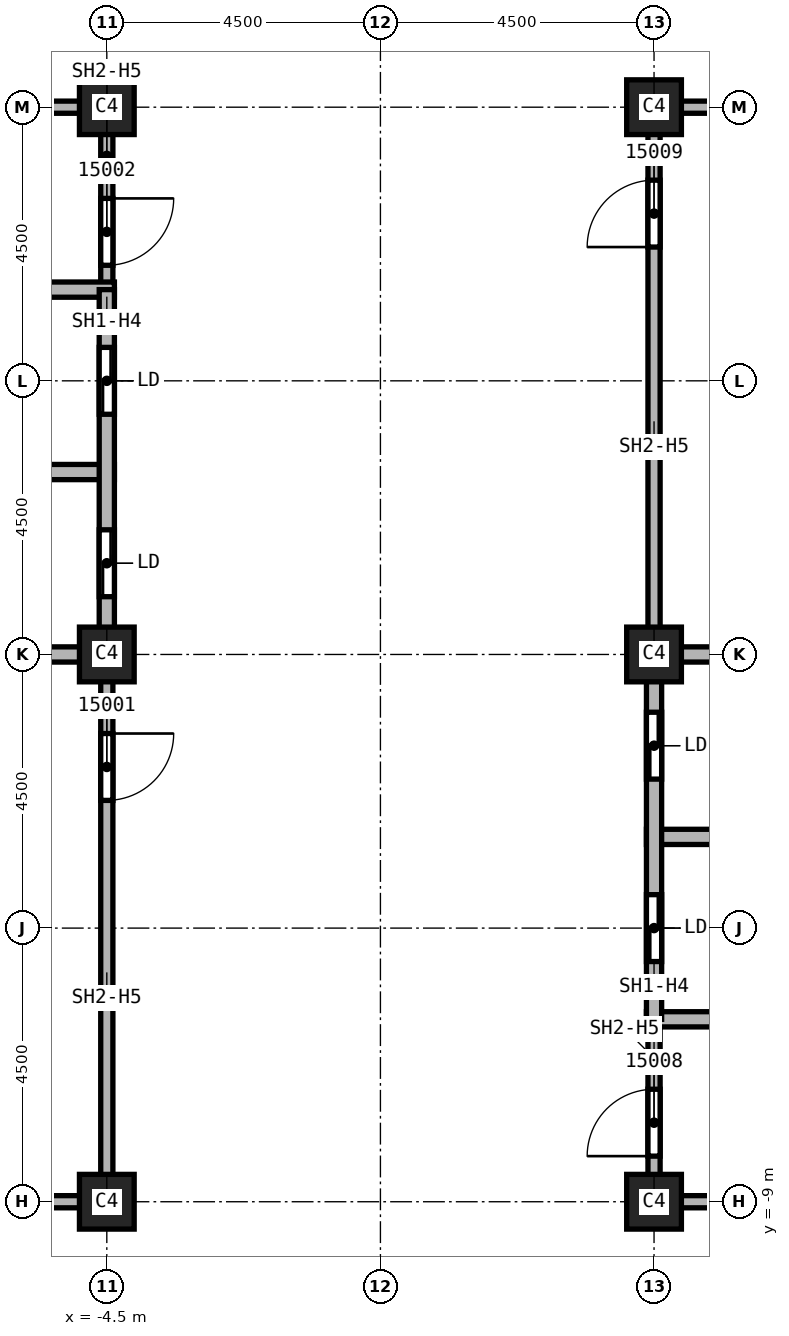
"""IFC4 building model, lengths in metres.
Left out: names, types, materials, properties, quantities, classifications, styles, units other than length and angle.
Written with IfcOpenShell. Run it as: python <this file> out.ifc"""

import sys

from ifc_helpers import new_model, si_unit, direction, frame, frame_2d, origin, origin_2d, place, context, subcontext, project, spatial, rectangle, extrude, element, fill, save


model = new_model("IFC4")
c1 = context("Model", 3, precision=1e-05, world=origin(), true_north=direction((0.0, 1.0)))
c2 = subcontext(c1, "Body", "Model", "MODEL_VIEW")
j1 = project(units=[si_unit("LENGTHUNIT", "METRE"), si_unit("PLANEANGLEUNIT", "RADIAN")], contexts=[c1])
p1 = place(None, origin())
s1 = spatial("IfcSite", under=j1, at=p1, CompositionType="ELEMENT")
p2 = place(p1, origin())
s2 = spatial("IfcBuilding", under=s1, at=p2, CompositionType="ELEMENT")
p3 = place(p2, frame((0.0, 0.0, 232.0)))
s3 = spatial("IfcBuildingStorey", under=s2, at=p3, CompositionType="ELEMENT", Elevation=232.0)
for number, where, z_axis, x_axis in (
    (1, (4.5, 0.0, 0.0), (0.0, 0.0, 1.0), (1.0, 0.0, 0.0)),
    (2, (4.5, 9.0, 0.0), (0.0, 0.0, 1.0), (1.0, 0.0, 0.0)),
    (3, (4.5, -9.0, 0.0), (0.0, 0.0, 1.0), (1.0, 0.0, 0.0)),
    (4, (-4.5, 0.0, 0.0), (0.0, 0.0, 1.0), (1.0, 0.0, 0.0)),
    (5, (-4.5, 9.0, 0.0), (0.0, 0.0, 1.0), (1.0, 0.0, 0.0)),
    (6, (-4.5, -9.0, 0.0), (0.0, 0.0, 1.0), (1.0, 0.0, 0.0)),
):
    element("IfcColumn", number, at=place(p3, frame(where, z_axis=z_axis, x_axis=x_axis)), inside=s3, PredefinedType="COLUMN", context=c2, shape_type="SweptSolid", body=[
        extrude(rectangle(XDim=0.9, YDim=0.9, at=origin_2d()), origin(), (0.0, 0.0, 1.0), 3.6),
    ])
for number, where, z_axis, x_axis in (
    (7, (-7.5, 9.0, 0.0), (0.0, 0.0, 1.0), (1.0, 0.0, 0.0)),
    (8, (-4.5, -9.0, 0.0), (0.0, 0.0, 1.0), (-1.0, 0.0, 0.0)),
):
    element("IfcWall", number, at=place(p3, frame(where, z_axis=z_axis, x_axis=x_axis)), inside=s3, PredefinedType="SOLIDWALL", context=c2, shape_type="SweptSolid", body=[
        extrude(rectangle(XDim=3.0, YDim=0.2, at=frame_2d((1.5, 0.0))), origin(), (0.0, 0.0, 1.0), 2.838),
    ])
p4 = place(p3, frame((-4.5, 0.0, 0.0), z_axis=(0.0, 0.0, 1.0), x_axis=(0.0, -1.0, 0.0)))
e9 = element("IfcWall", 9, at=p4, inside=s3, PredefinedType="SOLIDWALL", context=c2, shape_type="SweptSolid", body=[
    extrude(rectangle(XDim=9.1, YDim=0.2, at=frame_2d((4.55, 0.0))), origin(), (0.0, 0.0, 1.0), 2.838),
])
p5 = place(p4, frame((1.3, 0.0, 0.0)))
e10 = element("IfcOpeningElement", 10, at=p5, cuts=e9, PredefinedType="OPENING", context=c2, shape_type="SweptSolid", body=[
    extrude(rectangle(XDim=1.1, YDim=2.1, at=frame_2d((0.55, 1.05))), frame((0.0, 0.1, 0.0), z_axis=(0.0, -1.0, 0.0), x_axis=(1.0, 0.0, 0.0)), (0.0, 0.0, 1.0), 0.2),
])
p6 = place(p3, frame((-4.5, 9.1, 0.0), z_axis=(0.0, 0.0, 1.0), x_axis=(0.0, -1.0, 0.0)))
e11 = element("IfcWall", 11, at=p6, inside=s3, PredefinedType="SOLIDWALL", context=c2, shape_type="SweptSolid", body=[
    extrude(rectangle(XDim=3.1, YDim=0.2, at=frame_2d((1.55, 0.0))), origin(), (0.0, 0.0, 1.0), 2.838),
])
p7 = place(p6, frame((1.6, 0.0, 0.0)))
e12 = element("IfcOpeningElement", 12, at=p7, cuts=e11, PredefinedType="OPENING", context=c2, shape_type="SweptSolid", body=[
    extrude(rectangle(XDim=1.1, YDim=2.1, at=frame_2d((0.55, 1.05))), frame((0.0, 0.1, 0.0), z_axis=(0.0, -1.0, 0.0), x_axis=(1.0, 0.0, 0.0)), (0.0, 0.0, 1.0), 0.2),
])
p8 = place(p3, frame((4.5, -9.1, 0.0), z_axis=(0.0, 0.0, 1.0), x_axis=(0.0, 1.0, 0.0)))
e13 = element("IfcWall", 13, at=p8, inside=s3, PredefinedType="SOLIDWALL", context=c2, shape_type="SweptSolid", body=[
    extrude(rectangle(XDim=3.1, YDim=0.2, at=frame_2d((1.55, 0.0))), origin(), (0.0, 0.0, 1.0), 2.838),
])
p9 = place(p8, frame((0.85, 0.0, 0.0)))
e14 = element("IfcOpeningElement", 14, at=p9, cuts=e13, PredefinedType="OPENING", context=c2, shape_type="SweptSolid", body=[
    extrude(rectangle(XDim=1.1, YDim=2.1, at=frame_2d((0.55, 1.05))), frame((0.0, 0.1, 0.0), z_axis=(0.0, -1.0, 0.0), x_axis=(1.0, 0.0, 0.0)), (0.0, 0.0, 1.0), 0.2),
])
p10 = place(p3, frame((4.5, 0.0, 0.0), z_axis=(0.0, 0.0, 1.0), x_axis=(0.0, 1.0, 0.0)))
e15 = element("IfcWall", 15, at=p10, inside=s3, PredefinedType="SOLIDWALL", context=c2, shape_type="SweptSolid", body=[
    extrude(rectangle(XDim=9.1, YDim=0.2, at=frame_2d((4.55, 0.0))), origin(), (0.0, 0.0, 1.0), 2.838),
])
p11 = place(p10, frame((6.7, 0.0, 0.0)))
e16 = element("IfcOpeningElement", 16, at=p11, cuts=e15, PredefinedType="OPENING", context=c2, shape_type="SweptSolid", body=[
    extrude(rectangle(XDim=1.1, YDim=2.1, at=frame_2d((0.55, 1.05))), frame((0.0, 0.1, 0.0), z_axis=(0.0, -1.0, 0.0), x_axis=(1.0, 0.0, 0.0)), (0.0, 0.0, 1.0), 0.2),
])
for number, where, z_axis, x_axis in (
    (17, (4.5, 9.0, 0.0), (0.0, 0.0, 1.0), (1.0, 0.0, 0.0)),
    (18, (7.5, -9.0, 0.0), (0.0, 0.0, 1.0), (-1.0, 0.0, 0.0)),
):
    element("IfcWall", number, at=place(p3, frame(where, z_axis=z_axis, x_axis=x_axis)), inside=s3, PredefinedType="SOLIDWALL", context=c2, shape_type="SweptSolid", body=[
        extrude(rectangle(XDim=3.0, YDim=0.2, at=frame_2d((1.5, 0.0))), origin(), (0.0, 0.0, 1.0), 2.838),
    ])
p12 = place(p3, frame((-13.625, 3.0, 0.0), z_axis=(0.0, 0.0, 1.0), x_axis=(1.0, 0.0, 0.0)))
e19 = element("IfcWall", 19, at=p12, inside=s3, PredefinedType="SOLIDWALL", context=c2, shape_type="SweptSolid", body=[
    extrude(rectangle(XDim=9.25, YDim=0.25, at=frame_2d((4.625, 0.0))), origin(), (0.0, 0.0, 1.0), 3.6),
])
p13 = place(p12, frame((3.25, 0.0, 0.0)))
e20 = element("IfcOpeningElement", 20, at=p13, cuts=e19, PredefinedType="OPENING", context=c2, shape_type="SweptSolid", body=[
    extrude(rectangle(XDim=1.1, YDim=2.1, at=frame_2d((0.55, 1.05))), frame((0.0, 0.125, 0.0), z_axis=(0.0, -1.0, 0.0), x_axis=(1.0, 0.0, 0.0)), (0.0, 0.0, 1.0), 0.25),
])
for number, where, z_axis, x_axis in (
    (21, (-7.625, 0.0, 0.0), (0.0, 0.0, 1.0), (1.0, 0.0, 0.0)),
    (22, (-7.625, 6.0, 0.0), (0.0, 0.0, 1.0), (1.0, 0.0, 0.0)),
):
    element("IfcWall", number, at=place(p3, frame(where, z_axis=z_axis, x_axis=x_axis)), inside=s3, PredefinedType="SOLIDWALL", context=c2, shape_type="SweptSolid", body=[
        extrude(rectangle(XDim=3.25, YDim=0.25, at=frame_2d((1.625, 0.0))), origin(), (0.0, 0.0, 1.0), 3.6),
    ])
p14 = place(p3, frame((-4.5, 6.0, 0.0), z_axis=(0.0, 0.0, 1.0), x_axis=(0.0, -1.0, 0.0)))
e23 = element("IfcWall", 23, at=p14, inside=s3, PredefinedType="SOLIDWALL", context=c2, shape_type="SweptSolid", body=[
    extrude(rectangle(XDim=6.0, YDim=0.25, at=frame_2d((3.0, 0.0))), origin(), (0.0, 0.0, 1.0), 2.838),
])
p15 = place(p14, frame((3.95, 0.0, 0.0)))
e24 = element("IfcOpeningElement", 24, at=p15, cuts=e23, PredefinedType="OPENING", context=c2, shape_type="SweptSolid", body=[
    extrude(rectangle(XDim=1.1, YDim=2.1, at=frame_2d((0.55, 1.05))), frame((0.0, 0.125, 0.0), z_axis=(0.0, -1.0, 0.0), x_axis=(1.0, 0.0, 0.0)), (0.0, 0.0, 1.0), 0.25),
])
p16 = place(p14, frame((0.95, 0.0, 0.0)))
e25 = element("IfcOpeningElement", 25, at=p16, cuts=e23, PredefinedType="OPENING", context=c2, shape_type="SweptSolid", body=[
    extrude(rectangle(XDim=1.1, YDim=2.1, at=frame_2d((0.55, 1.05))), frame((0.0, 0.125, 0.0), z_axis=(0.0, -1.0, 0.0), x_axis=(1.0, 0.0, 0.0)), (0.0, 0.0, 1.0), 0.25),
])
p17 = place(p3, frame((4.375, -6.0, 0.0), z_axis=(0.0, 0.0, 1.0), x_axis=(1.0, 0.0, 0.0)))
e26 = element("IfcWall", 26, at=p17, inside=s3, PredefinedType="SOLIDWALL", context=c2, shape_type="SweptSolid", body=[
    extrude(rectangle(XDim=3.25, YDim=0.25, at=frame_2d((1.625, 0.0))), origin(), (0.0, 0.0, 1.0), 3.6),
])
p18 = place(p3, frame((4.375, -3.0, 0.0), z_axis=(0.0, 0.0, 1.0), x_axis=(1.0, 0.0, 0.0)))
e27 = element("IfcWall", 27, at=p18, inside=s3, PredefinedType="SOLIDWALL", context=c2, shape_type="SweptSolid", body=[
    extrude(rectangle(XDim=9.25, YDim=0.25, at=frame_2d((4.625, 0.0))), origin(), (0.0, 0.0, 1.0), 3.6),
])
p19 = place(p18, frame((4.875, 0.0, 0.0)))
e28 = element("IfcOpeningElement", 28, at=p19, cuts=e27, PredefinedType="OPENING", context=c2, shape_type="SweptSolid", body=[
    extrude(rectangle(XDim=1.1, YDim=2.1, at=frame_2d((0.55, 1.05))), frame((0.0, 0.125, 0.0), z_axis=(0.0, -1.0, 0.0), x_axis=(1.0, 0.0, 0.0)), (0.0, 0.0, 1.0), 0.25),
])
p20 = place(p3, frame((4.375, 0.0, 0.0), z_axis=(0.0, 0.0, 1.0), x_axis=(1.0, 0.0, 0.0)))
e29 = element("IfcWall", 29, at=p20, inside=s3, PredefinedType="SOLIDWALL", context=c2, shape_type="SweptSolid", body=[
    extrude(rectangle(XDim=3.25, YDim=0.25, at=frame_2d((1.625, 0.0))), origin(), (0.0, 0.0, 1.0), 3.6),
])
p21 = place(p3, frame((4.5, -6.0, 0.0), z_axis=(0.0, 0.0, 1.0), x_axis=(0.0, 1.0, 0.0)))
e30 = element("IfcWall", 30, at=p21, inside=s3, PredefinedType="SOLIDWALL", context=c2, shape_type="SweptSolid", body=[
    extrude(rectangle(XDim=6.0, YDim=0.25, at=frame_2d((3.0, 0.0))), origin(), (0.0, 0.0, 1.0), 2.838),
])
p22 = place(p21, frame((0.95, 0.0, 0.0)))
e31 = element("IfcOpeningElement", 31, at=p22, cuts=e30, PredefinedType="OPENING", context=c2, shape_type="SweptSolid", body=[
    extrude(rectangle(XDim=1.1, YDim=2.1, at=frame_2d((0.55, 1.05))), frame((0.0, 0.125, 0.0), z_axis=(0.0, -1.0, 0.0), x_axis=(1.0, 0.0, 0.0)), (0.0, 0.0, 1.0), 0.25),
])
p23 = place(p21, frame((3.95, 0.0, 0.0)))
e32 = element("IfcOpeningElement", 32, at=p23, cuts=e30, PredefinedType="OPENING", context=c2, shape_type="SweptSolid", body=[
    extrude(rectangle(XDim=1.1, YDim=2.1, at=frame_2d((0.55, 1.05))), frame((0.0, 0.125, 0.0), z_axis=(0.0, -1.0, 0.0), x_axis=(1.0, 0.0, 0.0)), (0.0, 0.0, 1.0), 0.25),
])
p24 = place(p5, origin())
e33 = element("IfcDoor", 33, at=p24, inside=s3, OperationType="SINGLE_SWING_RIGHT", PredefinedType="DOOR", context=c2, shape_type="SweptSolid", body=[
    extrude(rectangle(XDim=1.1, YDim=2.1, at=frame_2d((0.55, 1.05))), frame((0.0, 0.025, 0.0), z_axis=(0.0, -1.0, 0.0), x_axis=(1.0, 0.0, 0.0)), (0.0, 0.0, 1.0), 0.05),
])
fill(e10, e33)
p25 = place(p7, origin())
e34 = element("IfcDoor", 34, at=p25, inside=s3, OperationType="SINGLE_SWING_LEFT", PredefinedType="DOOR", context=c2, shape_type="SweptSolid", body=[
    extrude(rectangle(XDim=1.1, YDim=2.1, at=frame_2d((0.55, 1.05))), frame((0.0, 0.025, 0.0), z_axis=(0.0, -1.0, 0.0), x_axis=(1.0, 0.0, 0.0)), (0.0, 0.0, 1.0), 0.05),
])
fill(e12, e34)
p26 = place(p9, origin())
e35 = element("IfcDoor", 35, at=p26, inside=s3, OperationType="SINGLE_SWING_LEFT", PredefinedType="DOOR", context=c2, shape_type="SweptSolid", body=[
    extrude(rectangle(XDim=1.1, YDim=2.1, at=frame_2d((0.55, 1.05))), frame((0.0, 0.025, 0.0), z_axis=(0.0, -1.0, 0.0), x_axis=(1.0, 0.0, 0.0)), (0.0, 0.0, 1.0), 0.05),
])
fill(e14, e35)
p27 = place(p11, origin())
e36 = element("IfcDoor", 36, at=p27, inside=s3, OperationType="SINGLE_SWING_RIGHT", PredefinedType="DOOR", context=c2, shape_type="SweptSolid", body=[
    extrude(rectangle(XDim=1.1, YDim=2.1, at=frame_2d((0.55, 1.05))), frame((0.0, 0.025, 0.0), z_axis=(0.0, -1.0, 0.0), x_axis=(1.0, 0.0, 0.0)), (0.0, 0.0, 1.0), 0.05),
])
fill(e16, e36)
p28 = place(p15, origin())
e37 = element("IfcDoor", 37, at=p28, inside=s3, OperationType="SLIDING_TO_LEFT", PredefinedType="DOOR", context=c2, shape_type="SweptSolid", body=[
    extrude(rectangle(XDim=1.1, YDim=2.1, at=frame_2d((0.55, 1.05))), frame((0.0, 0.025, 0.0), z_axis=(0.0, -1.0, 0.0), x_axis=(1.0, 0.0, 0.0)), (0.0, 0.0, 1.0), 0.05),
])
fill(e24, e37)
p29 = place(p16, origin())
e38 = element("IfcDoor", 38, at=p29, inside=s3, OperationType="SLIDING_TO_LEFT", PredefinedType="DOOR", context=c2, shape_type="SweptSolid", body=[
    extrude(rectangle(XDim=1.1, YDim=2.1, at=frame_2d((0.55, 1.05))), frame((0.0, 0.025, 0.0), z_axis=(0.0, -1.0, 0.0), x_axis=(1.0, 0.0, 0.0)), (0.0, 0.0, 1.0), 0.05),
])
fill(e25, e38)
p30 = place(p22, origin())
e39 = element("IfcDoor", 39, at=p30, inside=s3, OperationType="SLIDING_TO_LEFT", PredefinedType="DOOR", context=c2, shape_type="SweptSolid", body=[
    extrude(rectangle(XDim=1.1, YDim=2.1, at=frame_2d((0.55, 1.05))), frame((0.0, 0.025, 0.0), z_axis=(0.0, -1.0, 0.0), x_axis=(1.0, 0.0, 0.0)), (0.0, 0.0, 1.0), 0.05),
])
fill(e31, e39)
p31 = place(p23, origin())
e40 = element("IfcDoor", 40, at=p31, inside=s3, OperationType="SLIDING_TO_LEFT", PredefinedType="DOOR", context=c2, shape_type="SweptSolid", body=[
    extrude(rectangle(XDim=1.1, YDim=2.1, at=frame_2d((0.55, 1.05))), frame((0.0, 0.025, 0.0), z_axis=(0.0, -1.0, 0.0), x_axis=(1.0, 0.0, 0.0)), (0.0, 0.0, 1.0), 0.05),
])
fill(e32, e40)
save(model, sys.argv[1])
